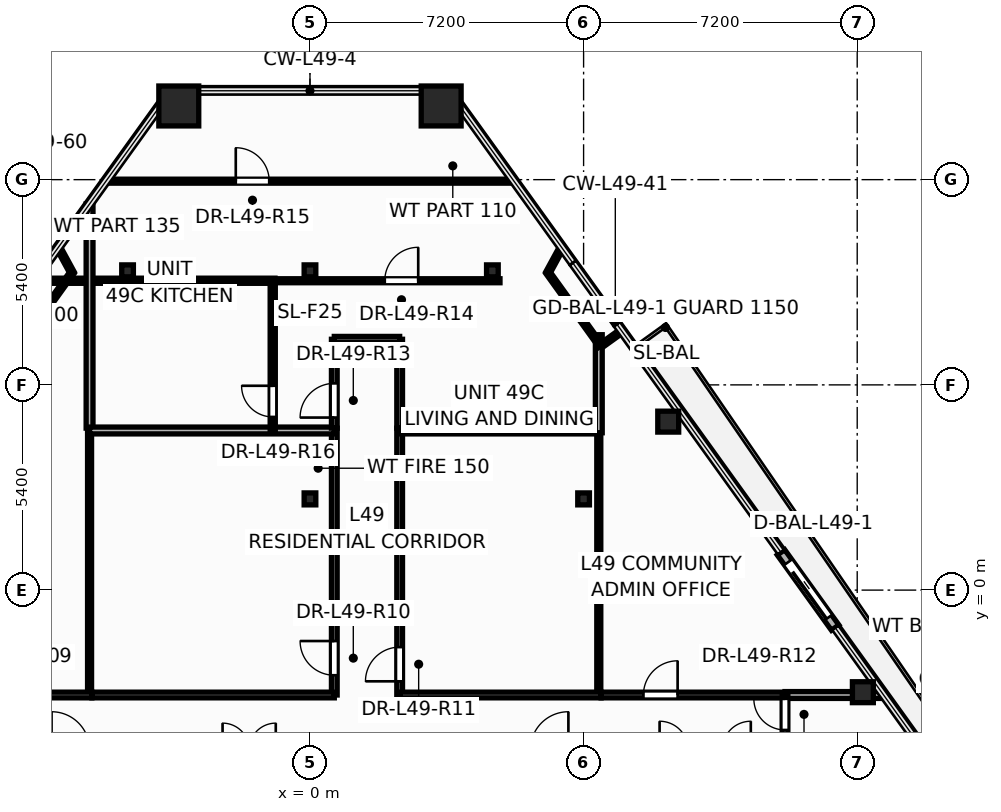
"""IFC4 building model, lengths in metres.
Left out: names, types, materials, properties, quantities, classifications, styles, units other than length and angle.
Written with IfcOpenShell. Run it as: python <this file> out.ifc"""

import sys

from ifc_helpers import new_model, si_unit, direction, frame, frame_2d, origin, origin_2d, place, context, subcontext, project, spatial, rectangle, hollow_rectangle, hollow_circle, i_section, extrude, element, fill, save


model = new_model("IFC4")
c1 = context("Model", 3, precision=1e-05, world=origin(), true_north=direction((0.0, 1.0)))
c2 = subcontext(c1, "Body", "Model", "MODEL_VIEW")
j1 = project(units=[si_unit("LENGTHUNIT", "METRE"), si_unit("PLANEANGLEUNIT", "RADIAN")], contexts=[c1])
p1 = place(None, origin())
s1 = spatial("IfcSite", under=j1, at=p1, CompositionType="ELEMENT")
p2 = place(p1, origin())
s2 = spatial("IfcBuilding", under=s1, at=p2, CompositionType="ELEMENT")
p3 = place(p2, frame((0.0, 0.0, 189.3)))
s3 = spatial("IfcBuildingStorey", under=s2, at=p3, CompositionType="ELEMENT", Elevation=189.3)
for number, where, z_axis, x_axis in (
    (1, (3.452, 12.739, 0.0), (0.0, 0.0, 1.0), (1.0, 0.0, 0.0)),
    (2, (-3.452, 12.739, 0.0), (0.0, 0.0, 1.0), (1.0, 0.0, 0.0)),
):
    element("IfcColumn", number, at=place(p3, frame(where, z_axis=z_axis, x_axis=x_axis)), inside=s3, PredefinedType="COLUMN", context=c2, shape_type="SweptSolid", body=[
        extrude(hollow_rectangle(XDim=1.05, YDim=1.05, WallThickness=0.045, at=origin_2d()), origin(), (0.0, 0.0, 1.0), 3.6),
    ])
for number, where, z_axis, x_axis in (
    (3, (14.549, -2.686, 0.0), (0.0, 0.0, 1.0), (1.0, 0.0, 0.0)),
    (4, (9.427, 4.433, 0.0), (0.0, 0.0, 1.0), (1.0, 0.0, 0.0)),
):
    element("IfcColumn", number, at=place(p3, frame(where, z_axis=z_axis, x_axis=x_axis)), inside=s3, PredefinedType="COLUMN", context=c2, shape_type="SweptSolid", body=[
        extrude(hollow_circle(Radius=0.275, WallThickness=0.024, at=origin_2d()), origin(), (0.0, 0.0, 1.0), 3.6),
    ])
for number, where, z_axis, x_axis in (
    (5, (0.0, 2.4, 0.0), (0.0, 0.0, 1.0), (1.0, 0.0, 0.0)),
    (6, (7.2, 2.4, 0.0), (0.0, 0.0, 1.0), (1.0, 0.0, 0.0)),
    (7, (-4.8, 8.4, 0.0), (0.0, 0.0, 1.0), (1.0, 0.0, 0.0)),
    (8, (0.0, 8.4, 0.0), (0.0, 0.0, 1.0), (1.0, 0.0, 0.0)),
    (9, (4.8, 8.4, 0.0), (0.0, 0.0, 1.0), (1.0, 0.0, 0.0)),
):
    element("IfcColumn", number, at=place(p3, frame(where, z_axis=z_axis, x_axis=x_axis)), inside=s3, PredefinedType="COLUMN", context=c2, shape_type="SweptSolid", body=[
        extrude(i_section(OverallWidth=0.307, OverallDepth=0.314, WebThickness=0.012, FlangeThickness=0.019, at=origin_2d()), origin(), (0.0, 0.0, 1.0), 3.6),
    ])
p4 = place(p3, frame((13.819, -0.987, -0.015), z_axis=(0.0, 0.0, 1.0), x_axis=(-0.583951454754, 0.811788579921, 0.0)))
e10 = element("IfcWall", 10, at=p4, inside=s3, PredefinedType="STANDARD", context=c2, shape_type="SweptSolid", body=[
    extrude(rectangle(XDim=2.44, YDim=0.24, at=frame_2d((1.22, 0.0))), origin(), (0.0, 0.0, 1.0), 2.807),
])
p5 = place(p4, frame((0.32, 0.0, 0.015)))
e11 = element("IfcOpeningElement", 11, at=p5, cuts=e10, PredefinedType="OPENING", context=c2, shape_type="SweptSolid", body=[
    extrude(rectangle(XDim=1.806, YDim=2.204, at=frame_2d((0.9, 1.102))), frame((0.0, 0.13, 0.0), z_axis=(0.0, -1.0, 0.0), x_axis=(1.0, 0.0, 0.0)), (0.0, 0.0, 1.0), 0.26),
])
p6 = place(p3, frame((-5.368, 10.76, 0.0), z_axis=(0.0, 0.0, 1.0), x_axis=(1.0, 0.0, 0.0)))
e12 = element("IfcWall", 12, at=p6, inside=s3, PredefinedType="PARTITIONING", context=c2, shape_type="SweptSolid", body=[
    extrude(rectangle(XDim=10.737, YDim=0.105, at=frame_2d((5.368, 0.0))), origin(), (0.0, 0.0, 1.0), 2.625),
])
p7 = place(p6, frame((3.416, 0.0, 0.0)))
e13 = element("IfcOpeningElement", 13, at=p7, cuts=e12, PredefinedType="OPENING", context=c2, shape_type="SweptSolid", body=[
    extrude(rectangle(XDim=0.886, YDim=2.104, at=frame_2d((0.44, 1.052))), frame((0.0, 0.062, 0.0), z_axis=(0.0, -1.0, 0.0), x_axis=(1.0, 0.0, 0.0)), (0.0, 0.0, 1.0), 0.125),
])
p8 = place(p3, frame((0.64, -2.76, 0.0), z_axis=(0.0, 0.0, 1.0), x_axis=(0.0, 1.0, 0.0)))
e14 = element("IfcWall", 14, at=p8, inside=s3, PredefinedType="PARTITIONING", context=c2, shape_type="SweptSolid", body=[
    extrude(rectangle(XDim=7.02, YDim=0.15, at=frame_2d((3.51, 0.0))), origin(), (0.0, 0.0, 1.0), 2.325),
])
p9 = place(p8, frame((0.52, 0.0, 0.0)))
e15 = element("IfcOpeningElement", 15, at=p9, cuts=e14, PredefinedType="OPENING", context=c2, shape_type="SweptSolid", body=[
    extrude(rectangle(XDim=0.906, YDim=2.104, at=frame_2d((0.45, 1.052))), frame((0.0, 0.085, 0.0), z_axis=(0.0, -1.0, 0.0), x_axis=(1.0, 0.0, 0.0)), (0.0, 0.0, 1.0), 0.17),
])
p10 = place(p3, frame((2.36, -2.76, 0.0), z_axis=(0.0, 0.0, 1.0), x_axis=(0.0, 1.0, 0.0)))
e16 = element("IfcWall", 16, at=p10, inside=s3, PredefinedType="PARTITIONING", context=c2, shape_type="SweptSolid", body=[
    extrude(rectangle(XDim=7.02, YDim=0.15, at=frame_2d((3.51, 0.0))), origin(), (0.0, 0.0, 1.0), 2.325),
])
p11 = place(p10, frame((0.36, 0.0, 0.0)))
e17 = element("IfcOpeningElement", 17, at=p11, cuts=e16, PredefinedType="OPENING", context=c2, shape_type="SweptSolid", body=[
    extrude(rectangle(XDim=0.906, YDim=2.104, at=frame_2d((0.45, 1.052))), frame((0.0, 0.085, 0.0), z_axis=(0.0, -1.0, 0.0), x_axis=(1.0, 0.0, 0.0)), (0.0, 0.0, 1.0), 0.17),
])
p12 = place(p3, frame((-5.8, -2.76, 0.0), z_axis=(0.0, 0.0, 1.0), x_axis=(0.0, 1.0, 0.0)))
e18 = element("IfcWall", 18, at=p12, inside=s3, PredefinedType="PARTITIONING", context=c2, shape_type="SweptSolid", body=[
    extrude(rectangle(XDim=7.02, YDim=0.105, at=frame_2d((3.51, 0.0))), origin(), (0.0, 0.0, 1.0), 2.325),
])
p13 = place(p3, frame((7.6, -2.76, 0.0), z_axis=(0.0, 0.0, 1.0), x_axis=(0.0, 1.0, 0.0)))
e19 = element("IfcWall", 19, at=p13, inside=s3, PredefinedType="PARTITIONING", context=c2, shape_type="SweptSolid", body=[
    extrude(rectangle(XDim=6.96, YDim=0.105, at=frame_2d((3.48, 0.0))), origin(), (0.0, 0.0, 1.0), 2.625),
])
p14 = place(p3, frame((-12.5, -2.76, 0.0), z_axis=(0.0, 0.0, 1.0), x_axis=(1.0, 0.0, 0.0)))
e20 = element("IfcWall", 20, at=p14, inside=s3, PredefinedType="PARTITIONING", context=c2, shape_type="SweptSolid", body=[
    extrude(rectangle(XDim=6.76, YDim=0.15, at=frame_2d((3.38, 0.0))), origin(), (0.0, 0.0, 1.0), 2.325),
])
p15 = place(p14, frame((1.675, 0.0, 0.0)))
e21 = element("IfcOpeningElement", 21, at=p15, cuts=e20, PredefinedType="OPENING", context=c2, shape_type="SweptSolid", body=[
    extrude(rectangle(XDim=0.906, YDim=2.104, at=frame_2d((0.45, 1.052))), frame((0.0, 0.085, 0.0), z_axis=(0.0, -1.0, 0.0), x_axis=(1.0, 0.0, 0.0)), (0.0, 0.0, 1.0), 0.17),
])
p16 = place(p3, frame((-5.738, -2.76, 0.0), z_axis=(0.0, 0.0, 1.0), x_axis=(1.0, 0.0, 0.0)))
e22 = element("IfcWall", 22, at=p16, inside=s3, PredefinedType="PARTITIONING", context=c2, shape_type="SweptSolid", body=[
    extrude(rectangle(XDim=6.378, YDim=0.15, at=frame_2d((3.189, 0.0))), origin(), (0.0, 0.0, 1.0), 2.325),
])
p17 = place(p3, frame((-7.253, 8.14, 0.0), z_axis=(0.0, 0.0, 1.0), x_axis=(1.0, 0.0, 0.0)))
e23 = element("IfcWall", 23, at=p17, inside=s3, PredefinedType="PARTITIONING", context=c2, shape_type="SweptSolid", body=[
    extrude(rectangle(XDim=6.333, YDim=0.135, at=frame_2d((3.167, 0.0))), origin(), (0.0, 0.0, 1.0), 2.625),
])
p18 = place(p3, frame((-5.8, 4.262, 0.0), z_axis=(0.0, 0.0, 1.0), x_axis=(0.0, 1.0, 0.0)))
e24 = element("IfcWall", 24, at=p18, inside=s3, PredefinedType="PARTITIONING", context=c2, shape_type="SweptSolid", body=[
    extrude(rectangle(XDim=5.898, YDim=0.18, at=frame_2d((2.949, 0.0))), origin(), (0.0, 0.0, 1.0), 2.625),
])
p19 = place(p3, frame((-0.98, 8.14, 0.0), z_axis=(0.0, 0.0, 1.0), x_axis=(1.0, 0.0, 0.0)))
e25 = element("IfcWall", 25, at=p19, inside=s3, PredefinedType="PARTITIONING", context=c2, shape_type="SweptSolid", body=[
    extrude(rectangle(XDim=5.98, YDim=0.105, at=frame_2d((2.99, 0.0))), origin(), (0.0, 0.0, 1.0), 2.325),
])
p20 = place(p19, frame((2.948, 0.0, 0.0)))
e26 = element("IfcOpeningElement", 26, at=p20, cuts=e25, PredefinedType="OPENING", context=c2, shape_type="SweptSolid", body=[
    extrude(rectangle(XDim=0.886, YDim=2.104, at=frame_2d((0.44, 1.052))), frame((0.0, 0.062, 0.0), z_axis=(0.0, -1.0, 0.0), x_axis=(1.0, 0.0, 0.0)), (0.0, 0.0, 1.0), 0.125),
])
p21 = place(p3, frame((2.36, -2.76, 0.0), z_axis=(0.0, 0.0, 1.0), x_axis=(1.0, 0.0, 0.0)))
e27 = element("IfcWall", 27, at=p21, inside=s3, PredefinedType="PARTITIONING", context=c2, shape_type="SweptSolid", body=[
    extrude(rectangle(XDim=5.3, YDim=0.15, at=frame_2d((2.65, 0.0))), origin(), (0.0, 0.0, 1.0), 2.325),
])
p22 = place(p3, frame((2.36, 4.2, 0.0), z_axis=(0.0, 0.0, 1.0), x_axis=(1.0, 0.0, 0.0)))
e28 = element("IfcWall", 28, at=p22, inside=s3, PredefinedType="PARTITIONING", context=c2, shape_type="SweptSolid", body=[
    extrude(rectangle(XDim=5.24, YDim=0.18, at=frame_2d((2.62, 0.0))), origin(), (0.0, 0.0, 1.0), 2.625),
])
p23 = place(p3, frame((7.662, -2.76, 0.0), z_axis=(0.0, 0.0, 1.0), x_axis=(1.0, 0.0, 0.0)))
e29 = element("IfcWall", 29, at=p23, inside=s3, PredefinedType="PARTITIONING", context=c2, shape_type="SweptSolid", body=[
    extrude(rectangle(XDim=4.838, YDim=0.15, at=frame_2d((2.419, 0.0))), origin(), (0.0, 0.0, 1.0), 3.35),
])
p24 = place(p23, frame((1.112, 0.0, 0.0)))
e30 = element("IfcOpeningElement", 30, at=p24, cuts=e29, PredefinedType="OPENING", context=c2, shape_type="SweptSolid", body=[
    extrude(rectangle(XDim=0.906, YDim=2.104, at=frame_2d((0.45, 1.052))), frame((0.0, 0.085, 0.0), z_axis=(0.0, -1.0, 0.0), x_axis=(1.0, 0.0, 0.0)), (0.0, 0.0, 1.0), 0.17),
])
p25 = place(p3, frame((-5.8, 4.2, 0.0), z_axis=(0.0, 0.0, 1.0), x_axis=(1.0, 0.0, 0.0)))
e31 = element("IfcWall", 31, at=p25, inside=s3, PredefinedType="PARTITIONING", context=c2, shape_type="SweptSolid", body=[
    extrude(rectangle(XDim=6.44, YDim=0.18, at=frame_2d((3.22, 0.0))), origin(), (0.0, 0.0, 1.0), 2.325),
])
p26 = place(p3, frame((-0.98, 4.2, 0.0), z_axis=(0.0, 0.0, 1.0), x_axis=(0.0, 1.0, 0.0)))
e32 = element("IfcWall", 32, at=p26, inside=s3, PredefinedType="PARTITIONING", context=c2, shape_type="SweptSolid", body=[
    extrude(rectangle(XDim=3.94, YDim=0.135, at=frame_2d((1.97, 0.0))), origin(), (0.0, 0.0, 1.0), 3.35),
])
p27 = place(p26, frame((0.357, 0.0, 0.0)))
e33 = element("IfcOpeningElement", 33, at=p27, cuts=e32, PredefinedType="OPENING", context=c2, shape_type="SweptSolid", body=[
    extrude(rectangle(XDim=0.826, YDim=2.104, at=frame_2d((0.41, 1.052))), frame((0.0, 0.078, 0.0), z_axis=(0.0, -1.0, 0.0), x_axis=(1.0, 0.0, 0.0)), (0.0, 0.0, 1.0), 0.155),
])
p28 = place(p3, frame((12.5, -2.76, 0.0), z_axis=(0.0, 0.0, 1.0), x_axis=(1.0, 0.0, 0.0)))
e34 = element("IfcWall", 34, at=p28, inside=s3, PredefinedType="PARTITIONING", context=c2, shape_type="SweptSolid", body=[
    extrude(rectangle(XDim=2.595, YDim=0.18, at=frame_2d((1.297, 0.0))), origin(), (0.0, 0.0, 1.0), 2.625),
])
p29 = place(p3, frame((7.6, 4.14, 0.0), z_axis=(0.0, 0.0, 1.0), x_axis=(0.0, 1.0, 0.0)))
e35 = element("IfcWall", 35, at=p29, inside=s3, PredefinedType="PARTITIONING", context=c2, shape_type="SweptSolid", body=[
    extrude(rectangle(XDim=2.58, YDim=0.18, at=frame_2d((1.29, 0.0))), origin(), (0.0, 0.0, 1.0), 2.625),
])
p30 = place(p3, frame((0.64, 4.262, 0.0), z_axis=(0.0, 0.0, 1.0), x_axis=(0.0, 1.0, 0.0)))
e36 = element("IfcWall", 36, at=p30, inside=s3, PredefinedType="PARTITIONING", context=c2, shape_type="SweptSolid", body=[
    extrude(rectangle(XDim=2.338, YDim=0.15, at=frame_2d((1.169, 0.0))), origin(), (0.0, 0.0, 1.0), 3.35),
])
p31 = place(p30, frame((0.278, 0.0, 0.0)))
e37 = element("IfcOpeningElement", 37, at=p31, cuts=e36, PredefinedType="OPENING", context=c2, shape_type="SweptSolid", body=[
    extrude(rectangle(XDim=0.906, YDim=2.104, at=frame_2d((0.45, 1.052))), frame((0.0, 0.085, 0.0), z_axis=(0.0, -1.0, 0.0), x_axis=(1.0, 0.0, 0.0)), (0.0, 0.0, 1.0), 0.17),
])
p32 = place(p3, frame((2.36, 4.262, 0.0), z_axis=(0.0, 0.0, 1.0), x_axis=(0.0, 1.0, 0.0)))
e38 = element("IfcWall", 38, at=p32, inside=s3, PredefinedType="PARTITIONING", context=c2, shape_type="SweptSolid", body=[
    extrude(rectangle(XDim=2.338, YDim=0.15, at=frame_2d((1.169, 0.0))), origin(), (0.0, 0.0, 1.0), 2.969),
])
for number, where, z_axis, x_axis in (
    (39, (-6.261, 8.354, 0.0), (0.0, 0.0, 1.0), (-0.584, -0.812, 0.0)),
    (40, (7.65, 6.424, 0.0), (0.0, 0.0, 1.0), (-0.584, 0.812, 0.0)),
):
    element("IfcWall", number, at=place(p3, frame(where, z_axis=z_axis, x_axis=x_axis)), inside=s3, PredefinedType="PARTITIONING", context=c2, shape_type="SweptSolid", body=[
        extrude(rectangle(XDim=2.378, YDim=0.12, at=frame_2d((1.189, 0.0))), origin(), (0.0, 0.0, 1.0), 3.35),
    ])
p33 = place(p3, frame((0.64, 6.6, 0.0), z_axis=(0.0, 0.0, 1.0), x_axis=(1.0, 0.0, 0.0)))
e41 = element("IfcWall", 41, at=p33, inside=s3, PredefinedType="PARTITIONING", context=c2, shape_type="SweptSolid", body=[
    extrude(rectangle(XDim=1.72, YDim=0.15, at=frame_2d((0.86, 0.0))), origin(), (0.0, 0.0, 1.0), 2.969),
])
p34 = place(p3, frame((12.5, -4.24, 0.0), z_axis=(0.0, 0.0, 1.0), x_axis=(0.0, 1.0, 0.0)))
e42 = element("IfcWall", 42, at=p34, inside=s3, PredefinedType="PARTITIONING", context=c2, shape_type="SweptSolid", body=[
    extrude(rectangle(XDim=1.48, YDim=0.15, at=frame_2d((0.74, 0.0))), origin(), (0.0, 0.0, 1.0), 2.325),
])
p35 = place(p34, frame((0.56, 0.0, 0.0)))
e43 = element("IfcOpeningElement", 43, at=p35, cuts=e42, PredefinedType="OPENING", context=c2, shape_type="SweptSolid", body=[
    extrude(rectangle(XDim=0.826, YDim=2.104, at=frame_2d((0.41, 1.052))), frame((0.0, 0.085, 0.0), z_axis=(0.0, -1.0, 0.0), x_axis=(1.0, 0.0, 0.0)), (0.0, 0.0, 1.0), 0.17),
])
for number, where, z_axis, x_axis in (
    (44, (-6.617, 9.007, 0.0), (0.0, 0.0, 1.0), (0.478, -0.878, 0.0)),
    (45, (6.261, 8.354, 0.0), (0.0, 0.0, 1.0), (0.478, 0.878, 0.0)),
):
    element("IfcWall", number, at=place(p3, frame(where, z_axis=z_axis, x_axis=x_axis)), inside=s3, PredefinedType="PARTITIONING", context=c2, shape_type="SweptSolid", body=[
        extrude(rectangle(XDim=0.744, YDim=0.12, at=frame_2d((0.372, 0.0))), origin(), (0.0, 0.0, 1.0), 2.792),
    ])
p36 = place(p3, frame((8.194, 6.815, 0.0), z_axis=(0.0, 0.0, 1.0), x_axis=(-0.811734696256, -0.584026354622, 0.0)))
e46 = element("IfcWall", 46, at=p36, inside=s3, PredefinedType="PARTITIONING", context=c2, shape_type="SweptSolid", body=[
    extrude(rectangle(XDim=0.67, YDim=0.12, at=frame_2d((0.335, 0.0))), origin(), (0.0, 0.0, 1.0), 2.792),
])
p37 = place(p5, origin())
e47 = element("IfcDoor", 47, at=p37, inside=s3, OperationType="SLIDING_TO_LEFT", PredefinedType="DOOR", context=c2, shape_type="SweptSolid", body=[
    extrude(rectangle(XDim=1.8, YDim=2.2, at=frame_2d((0.9, 1.1))), frame((0.0, 0.025, 0.0), z_axis=(0.0, -1.0, 0.0), x_axis=(1.0, 0.0, 0.0)), (0.0, 0.0, 1.0), 0.05),
])
fill(e11, e47)
p38 = place(p35, origin())
e48 = element("IfcDoor", 48, at=p38, inside=s3, OperationType="SINGLE_SWING_RIGHT", PredefinedType="DOOR", context=c2, shape_type="SweptSolid", body=[
    extrude(rectangle(XDim=0.82, YDim=2.1, at=frame_2d((0.41, 1.05))), frame((0.0, 0.025, 0.0), z_axis=(0.0, -1.0, 0.0), x_axis=(1.0, 0.0, 0.0)), (0.0, 0.0, 1.0), 0.05),
])
fill(e43, e48)
p39 = place(p9, origin())
e49 = element("IfcDoor", 49, at=p39, inside=s3, OperationType="SINGLE_SWING_RIGHT", PredefinedType="DOOR", context=c2, shape_type="SweptSolid", body=[
    extrude(rectangle(XDim=0.9, YDim=2.1, at=frame_2d((0.45, 1.05))), frame((0.0, 0.025, 0.0), z_axis=(0.0, -1.0, 0.0), x_axis=(1.0, 0.0, 0.0)), (0.0, 0.0, 1.0), 0.05),
])
fill(e15, e49)
p40 = place(p11, origin())
e50 = element("IfcDoor", 50, at=p40, inside=s3, OperationType="SINGLE_SWING_LEFT", PredefinedType="DOOR", context=c2, shape_type="SweptSolid", body=[
    extrude(rectangle(XDim=0.9, YDim=2.1, at=frame_2d((0.45, 1.05))), frame((0.0, 0.025, 0.0), z_axis=(0.0, -1.0, 0.0), x_axis=(1.0, 0.0, 0.0)), (0.0, 0.0, 1.0), 0.05),
])
fill(e17, e50)
p41 = place(p24, origin())
e51 = element("IfcDoor", 51, at=p41, inside=s3, OperationType="SINGLE_SWING_RIGHT", PredefinedType="DOOR", context=c2, shape_type="SweptSolid", body=[
    extrude(rectangle(XDim=0.9, YDim=2.1, at=frame_2d((0.45, 1.05))), frame((0.0, 0.025, 0.0), z_axis=(0.0, -1.0, 0.0), x_axis=(1.0, 0.0, 0.0)), (0.0, 0.0, 1.0), 0.05),
])
fill(e30, e51)
p42 = place(p31, origin())
e52 = element("IfcDoor", 52, at=p42, inside=s3, OperationType="SINGLE_SWING_LEFT", PredefinedType="DOOR", context=c2, shape_type="SweptSolid", body=[
    extrude(rectangle(XDim=0.9, YDim=2.1, at=frame_2d((0.45, 1.05))), frame((0.0, 0.025, 0.0), z_axis=(0.0, -1.0, 0.0), x_axis=(1.0, 0.0, 0.0)), (0.0, 0.0, 1.0), 0.05),
])
fill(e37, e52)
p43 = place(p20, origin())
e53 = element("IfcDoor", 53, at=p43, inside=s3, OperationType="SINGLE_SWING_RIGHT", PredefinedType="DOOR", context=c2, shape_type="SweptSolid", body=[
    extrude(rectangle(XDim=0.88, YDim=2.1, at=frame_2d((0.44, 1.05))), frame((0.0, 0.025, 0.0), z_axis=(0.0, -1.0, 0.0), x_axis=(1.0, 0.0, 0.0)), (0.0, 0.0, 1.0), 0.05),
])
fill(e26, e53)
p44 = place(p7, origin())
e54 = element("IfcDoor", 54, at=p44, inside=s3, OperationType="SINGLE_SWING_LEFT", PredefinedType="DOOR", context=c2, shape_type="SweptSolid", body=[
    extrude(rectangle(XDim=0.88, YDim=2.1, at=frame_2d((0.44, 1.05))), frame((0.0, 0.025, 0.0), z_axis=(0.0, -1.0, 0.0), x_axis=(1.0, 0.0, 0.0)), (0.0, 0.0, 1.0), 0.05),
])
fill(e13, e54)
p45 = place(p27, origin())
e55 = element("IfcDoor", 55, at=p45, inside=s3, OperationType="SINGLE_SWING_RIGHT", PredefinedType="DOOR", context=c2, shape_type="SweptSolid", body=[
    extrude(rectangle(XDim=0.82, YDim=2.1, at=frame_2d((0.41, 1.05))), frame((0.0, 0.025, 0.0), z_axis=(0.0, -1.0, 0.0), x_axis=(1.0, 0.0, 0.0)), (0.0, 0.0, 1.0), 0.05),
])
fill(e33, e55)
save(model, sys.argv[1])
